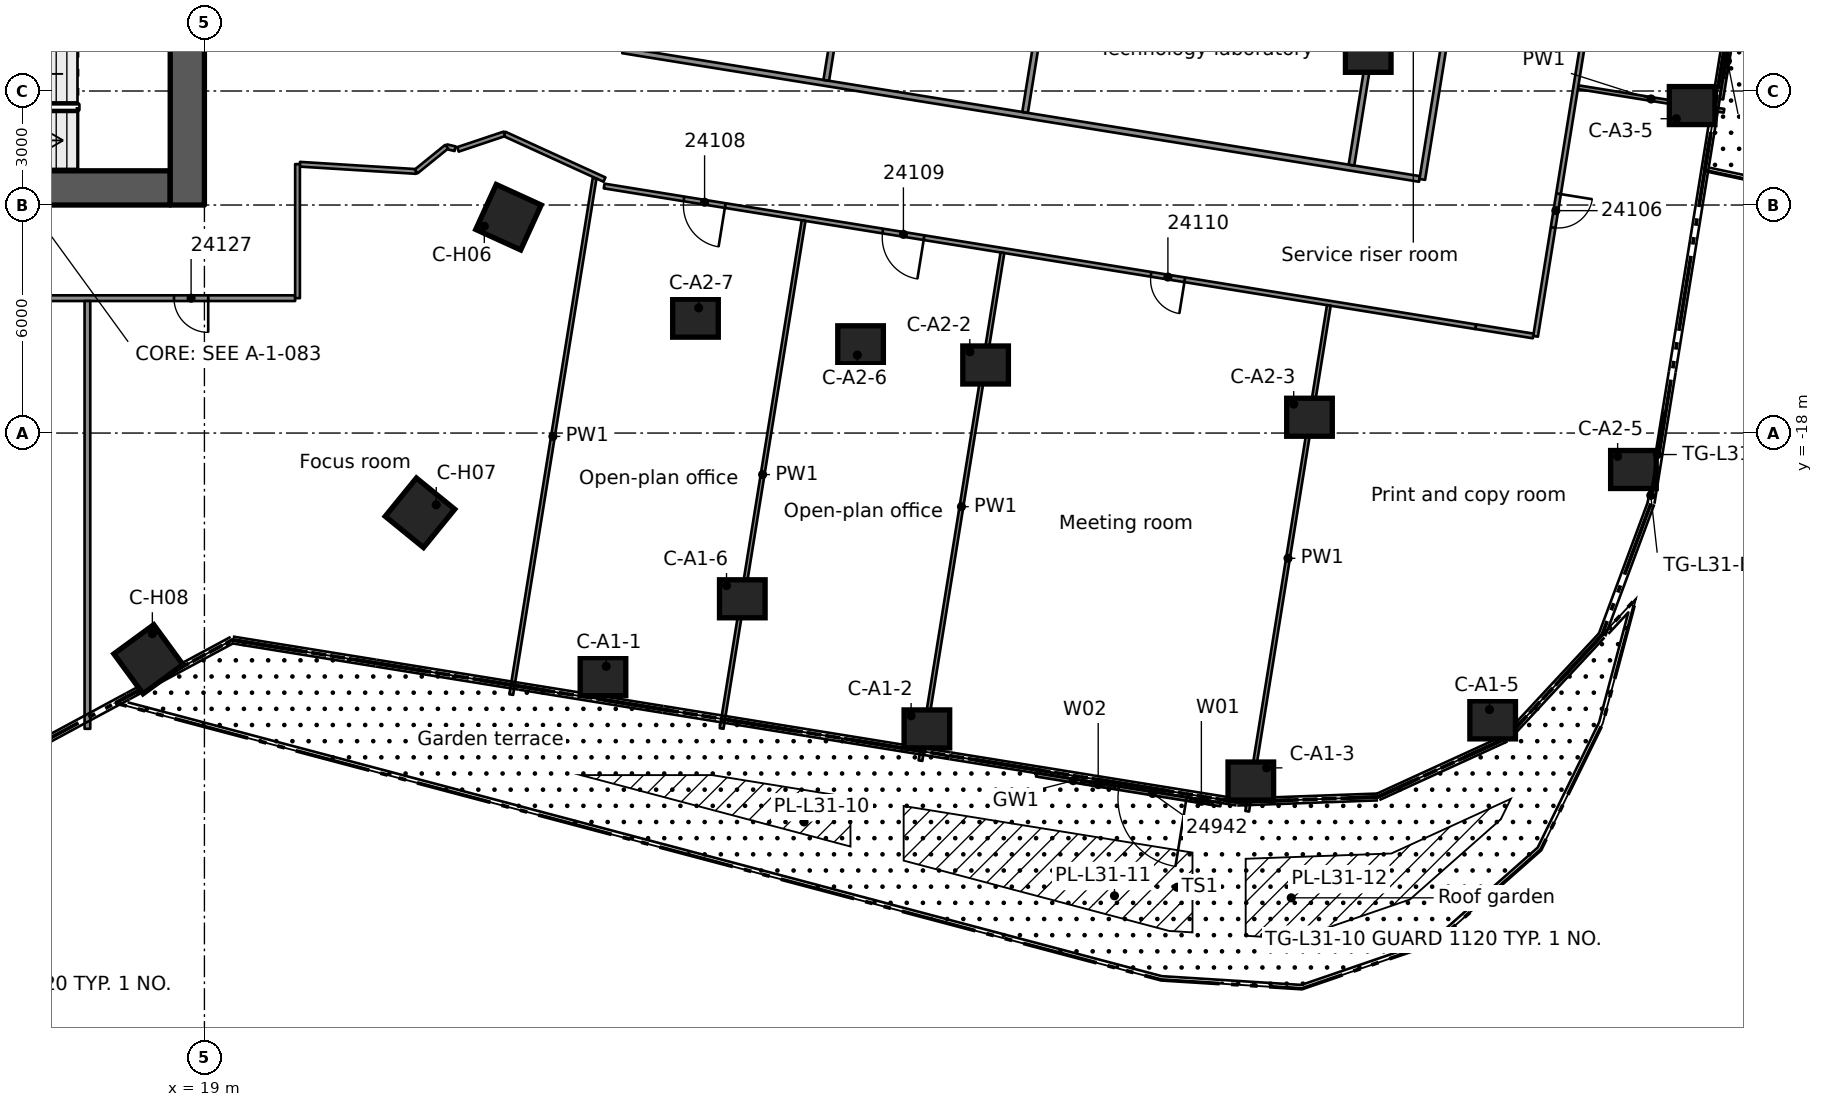
"""IFC4 building model, lengths in metres.
Left out: names, types, materials, properties, quantities, classifications, styles, units other than length and angle.
Written with IfcOpenShell. Run it as: python <this file> out.ifc"""

import sys

from ifc_helpers import new_model, si_unit, direction, frame, frame_2d, origin, origin_2d, place, context, subcontext, project, spatial, rectangle, extrude, element, fill, save


model = new_model("IFC4")
c1 = context("Model", 3, precision=1e-05, world=origin(), true_north=direction((0.0, 1.0)))
c2 = subcontext(c1, "Body", "Model", "MODEL_VIEW")
j1 = project(units=[si_unit("LENGTHUNIT", "METRE"), si_unit("PLANEANGLEUNIT", "RADIAN")], contexts=[c1])
p1 = place(None, origin())
s1 = spatial("IfcSite", under=j1, at=p1, CompositionType="ELEMENT")
p2 = place(p1, origin())
s2 = spatial("IfcBuilding", under=s1, at=p2, CompositionType="ELEMENT")
p3 = place(p2, frame((0.0, 0.0, 123.7)))
s3 = spatial("IfcBuildingStorey", under=s2, at=p3, CompositionType="ELEMENT", Elevation=123.7)
p4 = place(p3, frame((8.9, -11.55, 0.0), z_axis=(0.0, 0.0, 1.0), x_axis=(1.0, 0.0, 0.0)))
e1 = element("IfcWall", 1, at=p4, inside=s3, PredefinedType="SHEAR", context=c2, shape_type="SweptSolid", body=[
    extrude(rectangle(XDim=9.2, YDim=0.9, at=frame_2d((4.6, 0.0))), origin(), (0.0, 0.0, 1.0), 3.5),
])
p5 = place(p4, frame((3.0, 0.0, 0.0)))
e2 = element("IfcOpeningElement", 2, at=p5, cuts=e1, PredefinedType="OPENING", context=c2, shape_type="SweptSolid", body=[
    extrude(rectangle(XDim=1.1, YDim=2.1, at=frame_2d((0.55, 1.05))), frame((0.0, 0.46, 0.0), z_axis=(0.0, -1.0, 0.0), x_axis=(1.0, 0.0, 0.0)), (0.0, 0.0, 1.0), 0.92),
])
p6 = place(p3, frame((18.55, -12.0, 0.0), z_axis=(0.0, 0.0, 1.0), x_axis=(0.0, 1.0, 0.0)))
e3 = element("IfcWall", 3, at=p6, inside=s3, PredefinedType="SHEAR", context=c2, shape_type="SweptSolid", body=[
    extrude(rectangle(XDim=24.0, YDim=0.9, at=frame_2d((12.0, 0.0))), origin(), (0.0, 0.0, 1.0), 3.5),
])
p7 = place(p6, frame((12.1, 0.0, 0.0)))
e4 = element("IfcOpeningElement", 4, at=p7, cuts=e3, PredefinedType="OPENING", context=c2, shape_type="SweptSolid", body=[
    extrude(rectangle(XDim=1.8, YDim=2.1, at=frame_2d((0.9, 1.05))), frame((0.0, 0.46, 0.0), z_axis=(0.0, -1.0, 0.0), x_axis=(1.0, 0.0, 0.0)), (0.0, 0.0, 1.0), 0.92),
])
for number, where, z_axis, x_axis in (
    (5, (29.488, -24.409, 0.0), (0.0, 0.0, 1.0), (1.0, 0.0, 0.0)),
    (6, (38.011, -25.785, 0.0), (0.0, 0.0, 1.0), (1.0, 0.0, 0.0)),
    (7, (46.535, -27.156, 0.0), (0.0, 0.0, 1.0), (1.0, 0.0, 0.0)),
    (8, (52.899, -25.547, 0.0), (0.0, 0.0, 1.0), (1.0, 0.0, 0.0)),
    (9, (33.154, -22.361, 0.0), (0.0, 0.0, 1.0), (1.0, 0.0, 0.0)),
    (10, (39.556, -16.209, 0.0), (0.0, 0.0, 1.0), (1.0, 0.0, 0.0)),
    (11, (48.079, -17.584, 0.0), (0.0, 0.0, 1.0), (1.0, 0.0, 0.0)),
    (12, (56.603, -18.959, 0.0), (0.0, 0.0, 1.0), (1.0, 0.0, 0.0)),
    (13, (36.266, -15.678, 0.0), (0.0, 0.0, 1.0), (1.0, 0.0, 0.0)),
    (14, (31.922, -14.977, 0.0), (0.0, 0.0, 1.0), (1.0, 0.0, 0.0)),
    (15, (49.625, -8.008, 0.0), (0.0, 0.0, 1.0), (1.0, 0.0, 0.0)),
    (16, (58.148, -9.383, 0.0), (0.0, 0.0, 1.0), (1.0, 0.0, 0.0)),
):
    element("IfcColumn", number, at=place(p3, frame(where, z_axis=z_axis, x_axis=x_axis)), inside=s3, PredefinedType="COLUMN", context=c2, shape_type="SweptSolid", body=[
        extrude(rectangle(XDim=1.2, YDim=1.0, at=origin_2d()), origin(), (0.0, 0.0, 1.0), 3.5),
    ])
for number, where, z_axis, x_axis in (
    (17, (27.001, -12.321, 0.0), (0.0, 0.0, 1.0), (0.91, -0.415, 0.0)),
    (18, (24.672, -20.098, 0.0), (0.0, 0.0, 1.0), (0.775, -0.632, 0.0)),
    (19, (17.526, -23.951, 0.0), (0.0, 0.0, 1.0), (0.591, -0.807, 0.0)),
):
    element("IfcColumn", number, at=place(p3, frame(where, z_axis=z_axis, x_axis=x_axis)), inside=s3, PredefinedType="COLUMN", context=c2, shape_type="SweptSolid", body=[
        extrude(rectangle(XDim=1.3, YDim=1.3, at=origin_2d()), origin(), (0.0, 0.0, 1.0), 3.5),
    ])
p8 = place(p3, frame((59.701, -4.341, 0.0), z_axis=(0.0, 0.0, 1.0), x_axis=(-0.159319524755, -0.987227070654, 0.0)))
e20 = element("IfcWall", 20, at=p8, inside=s3, PredefinedType="STANDARD", context=c2, shape_type="SweptSolid", body=[
    extrude(rectangle(XDim=4.936, YDim=0.1, at=frame_2d((2.468, 0.0))), origin(), (0.0, 0.0, 1.0), 3.1),
])
p9 = place(p8, frame((1.568, 0.0, 0.0)))
e21 = element("IfcOpeningElement", 21, at=p9, cuts=e20, PredefinedType="OPENING", context=c2, shape_type="SweptSolid", body=[
    extrude(rectangle(XDim=1.8, YDim=2.4, at=frame_2d((0.9, 1.2))), frame((0.0, 0.06, 0.0), z_axis=(0.0, -1.0, 0.0), x_axis=(1.0, 0.0, 0.0)), (0.0, 0.0, 1.0), 0.12),
])
p10 = place(p8, frame((0.568, 0.0, 0.0)))
e22 = element("IfcOpeningElement", 22, at=p10, cuts=e20, PredefinedType="OPENING", context=c2, shape_type="SweptSolid", body=[
    extrude(rectangle(XDim=0.9, YDim=2.4, at=frame_2d((0.45, 1.2))), frame((0.0, 0.06, 0.0), z_axis=(0.0, -1.0, 0.0), x_axis=(1.0, 0.0, 0.0)), (0.0, 0.0, 1.0), 0.12),
])
p11 = place(p8, frame((3.468, 0.0, 0.0)))
e23 = element("IfcOpeningElement", 23, at=p11, cuts=e20, PredefinedType="OPENING", context=c2, shape_type="SweptSolid", body=[
    extrude(rectangle(XDim=0.9, YDim=2.4, at=frame_2d((0.45, 1.2))), frame((0.0, 0.06, 0.0), z_axis=(0.0, -1.0, 0.0), x_axis=(1.0, 0.0, 0.0)), (0.0, 0.0, 1.0), 0.12),
])
p12 = place(p3, frame((45.74, -27.771, 0.0), z_axis=(0.0, 0.0, 1.0), x_axis=(-0.987233559184, 0.159279313223, 0.0)))
e24 = element("IfcWall", 24, at=p12, inside=s3, PredefinedType="STANDARD", context=c2, shape_type="SweptSolid", body=[
    extrude(rectangle(XDim=4.913, YDim=0.1, at=frame_2d((2.456, 0.0))), origin(), (0.0, 0.0, 1.0), 3.1),
])
p13 = place(p12, frame((0.913, 0.0, 0.0)))
e25 = element("IfcOpeningElement", 25, at=p13, cuts=e24, PredefinedType="OPENING", context=c2, shape_type="SweptSolid", body=[
    extrude(rectangle(XDim=1.8, YDim=2.4, at=frame_2d((0.9, 1.2))), frame((0.0, 0.06, 0.0), z_axis=(0.0, -1.0, 0.0), x_axis=(1.0, 0.0, 0.0)), (0.0, 0.0, 1.0), 0.12),
])
p14 = place(p12, frame((0.213, 0.0, 0.0)))
e26 = element("IfcOpeningElement", 26, at=p14, cuts=e24, PredefinedType="OPENING", context=c2, shape_type="SweptSolid", body=[
    extrude(rectangle(XDim=0.6, YDim=2.4, at=frame_2d((0.3, 1.2))), frame((0.0, 0.06, 0.0), z_axis=(0.0, -1.0, 0.0), x_axis=(1.0, 0.0, 0.0)), (0.0, 0.0, 1.0), 0.12),
])
p15 = place(p12, frame((2.813, 0.0, 0.0)))
e27 = element("IfcOpeningElement", 27, at=p15, cuts=e24, PredefinedType="OPENING", context=c2, shape_type="SweptSolid", body=[
    extrude(rectangle(XDim=0.9, YDim=2.4, at=frame_2d((0.45, 1.2))), frame((0.0, 0.06, 0.0), z_axis=(0.0, -1.0, 0.0), x_axis=(1.0, 0.0, 0.0)), (0.0, 0.0, 1.0), 0.12),
])
p16 = place(p3, frame((29.527, -11.331, 0.0), z_axis=(0.0, 0.0, 1.0), x_axis=(-0.909663775555, 0.415345417024, 0.0)))
e28 = element("IfcWall", 28, at=p16, inside=s3, PredefinedType="PARTITIONING", context=c2, shape_type="SweptSolid", body=[
    extrude(rectangle(XDim=2.897, YDim=0.125, at=frame_2d((1.448, 0.0))), origin(), (0.0, 0.0, 1.0), 3.08),
])
p17 = place(p3, frame((25.374, -10.466, 0.0), z_axis=(0.0, 0.0, 1.0), x_axis=(0.972897607094, -0.23123634254, 0.0)))
e29 = element("IfcWall", 29, at=p17, inside=s3, PredefinedType="PARTITIONING", context=c2, shape_type="SweptSolid", body=[
    extrude(rectangle(XDim=0.229, YDim=0.125, at=frame_2d((0.115, 0.0))), origin(), (0.0, 0.0, 1.0), 3.08),
])
p18 = place(p3, frame((52.457, -15.204, 0.0), z_axis=(0.0, 0.0, 1.0), x_axis=(-0.987211158264, 0.159418094953, 0.0)))
e30 = element("IfcWall", 30, at=p18, inside=s3, PredefinedType="PARTITIONING", context=c2, shape_type="SweptSolid", body=[
    extrude(rectangle(XDim=23.235, YDim=0.125, at=frame_2d((11.618, 0.0))), origin(), (0.0, 0.0, 1.0), 3.08),
])
p19 = place(p18, frame((20.009, 0.0, 0.0)))
e31 = element("IfcOpeningElement", 31, at=p19, cuts=e30, PredefinedType="OPENING", context=c2, shape_type="SweptSolid", body=[
    extrude(rectangle(XDim=1.1, YDim=2.1, at=frame_2d((0.55, 1.05))), frame((0.0, 0.073, 0.0), z_axis=(0.0, -1.0, 0.0), x_axis=(1.0, 0.0, 0.0)), (0.0, 0.0, 1.0), 0.145),
])
p20 = place(p18, frame((14.709, 0.0, 0.0)))
e32 = element("IfcOpeningElement", 32, at=p20, cuts=e30, PredefinedType="OPENING", context=c2, shape_type="SweptSolid", body=[
    extrude(rectangle(XDim=1.1, YDim=2.1, at=frame_2d((0.55, 1.05))), frame((0.0, 0.073, 0.0), z_axis=(0.0, -1.0, 0.0), x_axis=(1.0, 0.0, 0.0)), (0.0, 0.0, 1.0), 0.145),
])
p21 = place(p18, frame((7.759, 0.0, 0.0)))
e33 = element("IfcOpeningElement", 33, at=p21, cuts=e30, PredefinedType="OPENING", context=c2, shape_type="SweptSolid", body=[
    extrude(rectangle(XDim=0.9, YDim=2.1, at=frame_2d((0.45, 1.05))), frame((0.0, 0.073, 0.0), z_axis=(0.0, -1.0, 0.0), x_axis=(1.0, 0.0, 0.0)), (0.0, 0.0, 1.0), 0.145),
])
p22 = place(p3, frame((30.005, -7.931, 0.0), z_axis=(0.0, 0.0, 1.0), x_axis=(0.987232842174, -0.15928375728, 0.0)))
e34 = element("IfcWall", 34, at=p22, inside=s3, PredefinedType="PARTITIONING", context=c2, shape_type="SweptSolid", body=[
    extrude(rectangle(XDim=21.239, YDim=0.15, at=frame_2d((10.62, 0.0))), origin(), (0.0, 0.0, 1.0), 3.08),
])
p23 = place(p3, frame((55.149, -8.9, 0.0), z_axis=(0.0, 0.0, 1.0), x_axis=(0.987198096363, -0.159498960929, 0.0)))
e35 = element("IfcWall", 35, at=p23, inside=s3, PredefinedType="PARTITIONING", context=c2, shape_type="SweptSolid", body=[
    extrude(rectangle(XDim=3.888, YDim=0.1, at=frame_2d((1.944, 0.0))), origin(), (0.0, 0.0, 1.0), 3.08),
])
p24 = place(p3, frame((52.457, -15.202, 0.0), z_axis=(0.0, 0.0, 1.0), x_axis=(0.987264599046, -0.159086804829, 0.0)))
e36 = element("IfcWall", 36, at=p24, inside=s3, PredefinedType="PARTITIONING", context=c2, shape_type="SweptSolid", body=[
    extrude(rectangle(XDim=1.529, YDim=0.125, at=frame_2d((0.764, 0.0))), origin(), (0.0, 0.0, 1.0), 3.08),
])
p25 = place(p3, frame((21.512, -10.927, 0.0), z_axis=(0.0, 0.0, 1.0), x_axis=(0.998077910875, -0.061971637243, 0.0)))
e37 = element("IfcWall", 37, at=p25, inside=s3, PredefinedType="PARTITIONING", context=c2, shape_type="SweptSolid", body=[
    extrude(rectangle(XDim=3.065, YDim=0.125, at=frame_2d((1.532, 0.0))), origin(), (0.0, 0.0, 1.0), 3.08),
])
p26 = place(p3, frame((21.387, -14.451, 0.0), z_axis=(0.0, 0.0, 1.0), x_axis=(-1.0, 0.0, 0.0)))
e38 = element("IfcWall", 38, at=p26, inside=s3, PredefinedType="PARTITIONING", context=c2, shape_type="SweptSolid", body=[
    extrude(rectangle(XDim=10.996, YDim=0.15, at=frame_2d((5.498, 0.0))), origin(), (0.0, 0.0, 1.0), 3.08),
])
p27 = place(p26, frame((7.816, 0.0, 0.0)))
e39 = element("IfcOpeningElement", 39, at=p27, cuts=e38, PredefinedType="OPENING", context=c2, shape_type="SweptSolid", body=[
    extrude(rectangle(XDim=0.9, YDim=2.1, at=frame_2d((0.45, 1.05))), frame((0.0, 0.085, 0.0), z_axis=(0.0, -1.0, 0.0), x_axis=(1.0, 0.0, 0.0)), (0.0, 0.0, 1.0), 0.17),
])
p28 = place(p26, frame((2.288, 0.0, 0.0)))
e40 = element("IfcOpeningElement", 40, at=p28, cuts=e38, PredefinedType="OPENING", context=c2, shape_type="SweptSolid", body=[
    extrude(rectangle(XDim=0.9, YDim=2.1, at=frame_2d((0.45, 1.05))), frame((0.0, 0.085, 0.0), z_axis=(0.0, -1.0, 0.0), x_axis=(1.0, 0.0, 0.0)), (0.0, 0.0, 1.0), 0.17),
])
p29 = place(p3, frame((25.672, -10.536, 0.0), z_axis=(0.0, 0.0, 1.0), x_axis=(0.948379197111, 0.317138610841, 0.0)))
e41 = element("IfcWall", 41, at=p29, inside=s3, PredefinedType="PARTITIONING", context=c2, shape_type="SweptSolid", body=[
    extrude(rectangle(XDim=1.286, YDim=0.125, at=frame_2d((0.643, 0.0))), origin(), (0.0, 0.0, 1.0), 3.08),
])
p30 = place(p3, frame((56.147, -2.317, 0.0), z_axis=(0.0, 0.0, 1.0), x_axis=(-0.159220326338, -0.987243074263, 0.0)))
e42 = element("IfcWall", 42, at=p30, inside=s3, PredefinedType="PARTITIONING", context=c2, shape_type="SweptSolid", body=[
    extrude(rectangle(XDim=13.308, YDim=0.125, at=frame_2d((6.654, 0.0))), origin(), (0.0, 0.0, 1.0), 3.08),
])
p31 = place(p30, frame((9.508, 0.0, 0.0)))
e43 = element("IfcOpeningElement", 43, at=p31, cuts=e42, PredefinedType="OPENING", context=c2, shape_type="SweptSolid", body=[
    extrude(rectangle(XDim=0.9, YDim=2.1, at=frame_2d((0.45, 1.05))), frame((0.0, 0.073, 0.0), z_axis=(0.0, -1.0, 0.0), x_axis=(1.0, 0.0, 0.0)), (0.0, 0.0, 1.0), 0.145),
])
p32 = place(p30, frame((2.857, 0.0, 0.0)))
e44 = element("IfcOpeningElement", 44, at=p32, cuts=e42, PredefinedType="OPENING", context=c2, shape_type="SweptSolid", body=[
    extrude(rectangle(XDim=0.9, YDim=2.1, at=frame_2d((0.45, 1.05))), frame((0.0, 0.073, 0.0), z_axis=(0.0, -1.0, 0.0), x_axis=(1.0, 0.0, 0.0)), (0.0, 0.0, 1.0), 0.145),
])
p33 = place(p3, frame((51.047, -11.326, 0.0), z_axis=(0.0, 0.0, 1.0), x_axis=(0.159359551121, 0.987220610333, 0.0)))
e45 = element("IfcWall", 45, at=p33, inside=s3, PredefinedType="PARTITIONING", context=c2, shape_type="SweptSolid", body=[
    extrude(rectangle(XDim=6.099, YDim=0.15, at=frame_2d((3.049, 0.0))), origin(), (0.0, 0.0, 1.0), 3.08),
])
p34 = place(p3, frame((46.44, -27.951, 0.0), z_axis=(0.0, 0.0, 1.0), x_axis=(0.159319546861, 0.987227067086, 0.0)))
e46 = element("IfcWall", 46, at=p34, inside=s3, PredefinedType="PARTITIONING", context=c2, shape_type="SweptSolid", body=[
    extrude(rectangle(XDim=13.482, YDim=0.1, at=frame_2d((6.741, 0.0))), origin(), (0.0, 0.0, 1.0), 3.08),
])
p35 = place(p3, frame((49.184, -10.949, 0.0), z_axis=(0.0, 0.0, 1.0), x_axis=(0.159192439694, 0.987247571354, 0.0)))
e47 = element("IfcWall", 47, at=p35, inside=s3, PredefinedType="PARTITIONING", context=c2, shape_type="SweptSolid", body=[
    extrude(rectangle(XDim=5.949, YDim=0.15, at=frame_2d((2.975, 0.0))), origin(), (0.0, 0.0, 1.0), 3.08),
])
p36 = place(p3, frame((37.842, -26.619, 0.0), z_axis=(0.0, 0.0, 1.0), x_axis=(0.159340172949, 0.98722373821, 0.0)))
e48 = element("IfcWall", 48, at=p36, inside=s3, PredefinedType="PARTITIONING", context=c2, shape_type="SweptSolid", body=[
    extrude(rectangle(XDim=13.537, YDim=0.1, at=frame_2d((6.769, 0.0))), origin(), (0.0, 0.0, 1.0), 3.08),
])
p37 = place(p3, frame((40.595, -9.563, 0.0), z_axis=(0.0, 0.0, 1.0), x_axis=(0.159352431511, 0.987221759572, 0.0)))
e49 = element("IfcWall", 49, at=p37, inside=s3, PredefinedType="PARTITIONING", context=c2, shape_type="SweptSolid", body=[
    extrude(rectangle(XDim=5.949, YDim=0.15, at=frame_2d((2.975, 0.0))), origin(), (0.0, 0.0, 1.0), 3.08),
])
p38 = place(p3, frame((32.61, -25.774, 0.0), z_axis=(0.0, 0.0, 1.0), x_axis=(0.159351521754, 0.98722190642, 0.0)))
e50 = element("IfcWall", 50, at=p38, inside=s3, PredefinedType="PARTITIONING", context=c2, shape_type="SweptSolid", body=[
    extrude(rectangle(XDim=13.536, YDim=0.1, at=frame_2d((6.768, 0.0))), origin(), (0.0, 0.0, 1.0), 3.08),
])
p39 = place(p3, frame((35.363, -8.719, 0.0), z_axis=(0.0, 0.0, 1.0), x_axis=(0.159192439694, 0.987247571354, 0.0)))
e51 = element("IfcWall", 51, at=p39, inside=s3, PredefinedType="PARTITIONING", context=c2, shape_type="SweptSolid", body=[
    extrude(rectangle(XDim=5.949, YDim=0.15, at=frame_2d((2.975, 0.0))), origin(), (0.0, 0.0, 1.0), 3.08),
])
p40 = place(p3, frame((27.075, -24.881, 0.0), z_axis=(0.0, 0.0, 1.0), x_axis=(0.159301605387, 0.98722996233, 0.0)))
e52 = element("IfcWall", 52, at=p40, inside=s3, PredefinedType="PARTITIONING", context=c2, shape_type="SweptSolid", body=[
    extrude(rectangle(XDim=13.761, YDim=0.1, at=frame_2d((6.88, 0.0))), origin(), (0.0, 0.0, 1.0), 3.08),
])
p41 = place(p3, frame((24.571, -11.117, 0.0), z_axis=(0.0, 0.0, 1.0), x_axis=(0.776843182064, 0.62969410866, 0.0)))
e53 = element("IfcWall", 53, at=p41, inside=s3, PredefinedType="PARTITIONING", context=c2, shape_type="SweptSolid", body=[
    extrude(rectangle(XDim=1.034, YDim=0.125, at=frame_2d((0.517, 0.0))), origin(), (0.0, 0.0, 1.0), 3.08),
])
p42 = place(p3, frame((21.45, -14.451, 0.0), z_axis=(0.0, 0.0, 1.0), x_axis=(0.0, 1.0, 0.0)))
e54 = element("IfcWall", 54, at=p42, inside=s3, PredefinedType="PARTITIONING", context=c2, shape_type="SweptSolid", body=[
    extrude(rectangle(XDim=3.528, YDim=0.125, at=frame_2d((1.764, 0.0))), origin(), (0.0, 0.0, 1.0), 3.08),
])
p43 = place(p3, frame((15.921, -25.782, 0.0), z_axis=(0.0, 0.0, 1.0), x_axis=(0.0, 1.0, 0.0)))
e55 = element("IfcWall", 55, at=p43, inside=s3, PredefinedType="PARTITIONING", context=c2, shape_type="SweptSolid", body=[
    extrude(rectangle(XDim=11.256, YDim=0.15, at=frame_2d((5.628, 0.0))), origin(), (0.0, 0.0, 1.0), 3.08),
])
p44 = place(p11, origin())
e56 = element("IfcWindow", 56, at=p44, inside=s3, PartitioningType="SINGLE_PANEL", PredefinedType="WINDOW", context=c2, shape_type="SweptSolid", body=[
    extrude(rectangle(XDim=0.9, YDim=2.4, at=frame_2d((0.45, 1.2))), frame((0.0, 0.03, 0.0), z_axis=(0.0, -1.0, 0.0), x_axis=(1.0, 0.0, 0.0)), (0.0, 0.0, 1.0), 0.06),
])
fill(e23, e56)
p45 = place(p13, origin())
e57 = element("IfcDoor", 57, at=p45, inside=s3, OperationType="DOUBLE_DOOR_SINGLE_SWING", PredefinedType="DOOR", context=c2, shape_type="SweptSolid", body=[
    extrude(rectangle(XDim=1.8, YDim=2.4, at=frame_2d((0.9, 1.2))), frame((0.0, 0.025, 0.0), z_axis=(0.0, -1.0, 0.0), x_axis=(1.0, 0.0, 0.0)), (0.0, 0.0, 1.0), 0.05),
])
fill(e25, e57)
p46 = place(p14, origin())
e58 = element("IfcWindow", 58, at=p46, inside=s3, PartitioningType="SINGLE_PANEL", PredefinedType="WINDOW", context=c2, shape_type="SweptSolid", body=[
    extrude(rectangle(XDim=0.6, YDim=2.4, at=frame_2d((0.3, 1.2))), frame((0.0, 0.03, 0.0), z_axis=(0.0, -1.0, 0.0), x_axis=(1.0, 0.0, 0.0)), (0.0, 0.0, 1.0), 0.06),
])
fill(e26, e58)
p47 = place(p15, origin())
e59 = element("IfcWindow", 59, at=p47, inside=s3, PartitioningType="SINGLE_PANEL", PredefinedType="WINDOW", context=c2, shape_type="SweptSolid", body=[
    extrude(rectangle(XDim=0.9, YDim=2.4, at=frame_2d((0.45, 1.2))), frame((0.0, 0.03, 0.0), z_axis=(0.0, -1.0, 0.0), x_axis=(1.0, 0.0, 0.0)), (0.0, 0.0, 1.0), 0.06),
])
fill(e27, e59)
p48 = place(p31, origin())
e60 = element("IfcDoor", 60, at=p48, inside=s3, OperationType="SINGLE_SWING_RIGHT", PredefinedType="DOOR", context=c2, shape_type="SweptSolid", body=[
    extrude(rectangle(XDim=0.9, YDim=2.1, at=frame_2d((0.45, 1.05))), frame((0.0, 0.025, 0.0), z_axis=(0.0, -1.0, 0.0), x_axis=(1.0, 0.0, 0.0)), (0.0, 0.0, 1.0), 0.05),
])
fill(e43, e60)
p49 = place(p19, origin())
e61 = element("IfcDoor", 61, at=p49, inside=s3, OperationType="SINGLE_SWING_RIGHT", PredefinedType="DOOR", context=c2, shape_type="SweptSolid", body=[
    extrude(rectangle(XDim=1.1, YDim=2.1, at=frame_2d((0.55, 1.05))), frame((0.0, 0.025, 0.0), z_axis=(0.0, -1.0, 0.0), x_axis=(1.0, 0.0, 0.0)), (0.0, 0.0, 1.0), 0.05),
])
fill(e31, e61)
p50 = place(p20, origin())
e62 = element("IfcDoor", 62, at=p50, inside=s3, OperationType="SINGLE_SWING_RIGHT", PredefinedType="DOOR", context=c2, shape_type="SweptSolid", body=[
    extrude(rectangle(XDim=1.1, YDim=2.1, at=frame_2d((0.55, 1.05))), frame((0.0, 0.025, 0.0), z_axis=(0.0, -1.0, 0.0), x_axis=(1.0, 0.0, 0.0)), (0.0, 0.0, 1.0), 0.05),
])
fill(e32, e62)
p51 = place(p21, origin())
e63 = element("IfcDoor", 63, at=p51, inside=s3, OperationType="SINGLE_SWING_LEFT", PredefinedType="DOOR", context=c2, shape_type="SweptSolid", body=[
    extrude(rectangle(XDim=0.9, YDim=2.1, at=frame_2d((0.45, 1.05))), frame((0.0, 0.025, 0.0), z_axis=(0.0, -1.0, 0.0), x_axis=(1.0, 0.0, 0.0)), (0.0, 0.0, 1.0), 0.05),
])
fill(e33, e63)
p52 = place(p28, origin())
e64 = element("IfcDoor", 64, at=p52, inside=s3, OperationType="SINGLE_SWING_LEFT", PredefinedType="DOOR", context=c2, shape_type="SweptSolid", body=[
    extrude(rectangle(XDim=0.9, YDim=2.1, at=frame_2d((0.45, 1.05))), frame((0.0, 0.025, 0.0), z_axis=(0.0, -1.0, 0.0), x_axis=(1.0, 0.0, 0.0)), (0.0, 0.0, 1.0), 0.05),
])
fill(e40, e64)
save(model, sys.argv[1])
